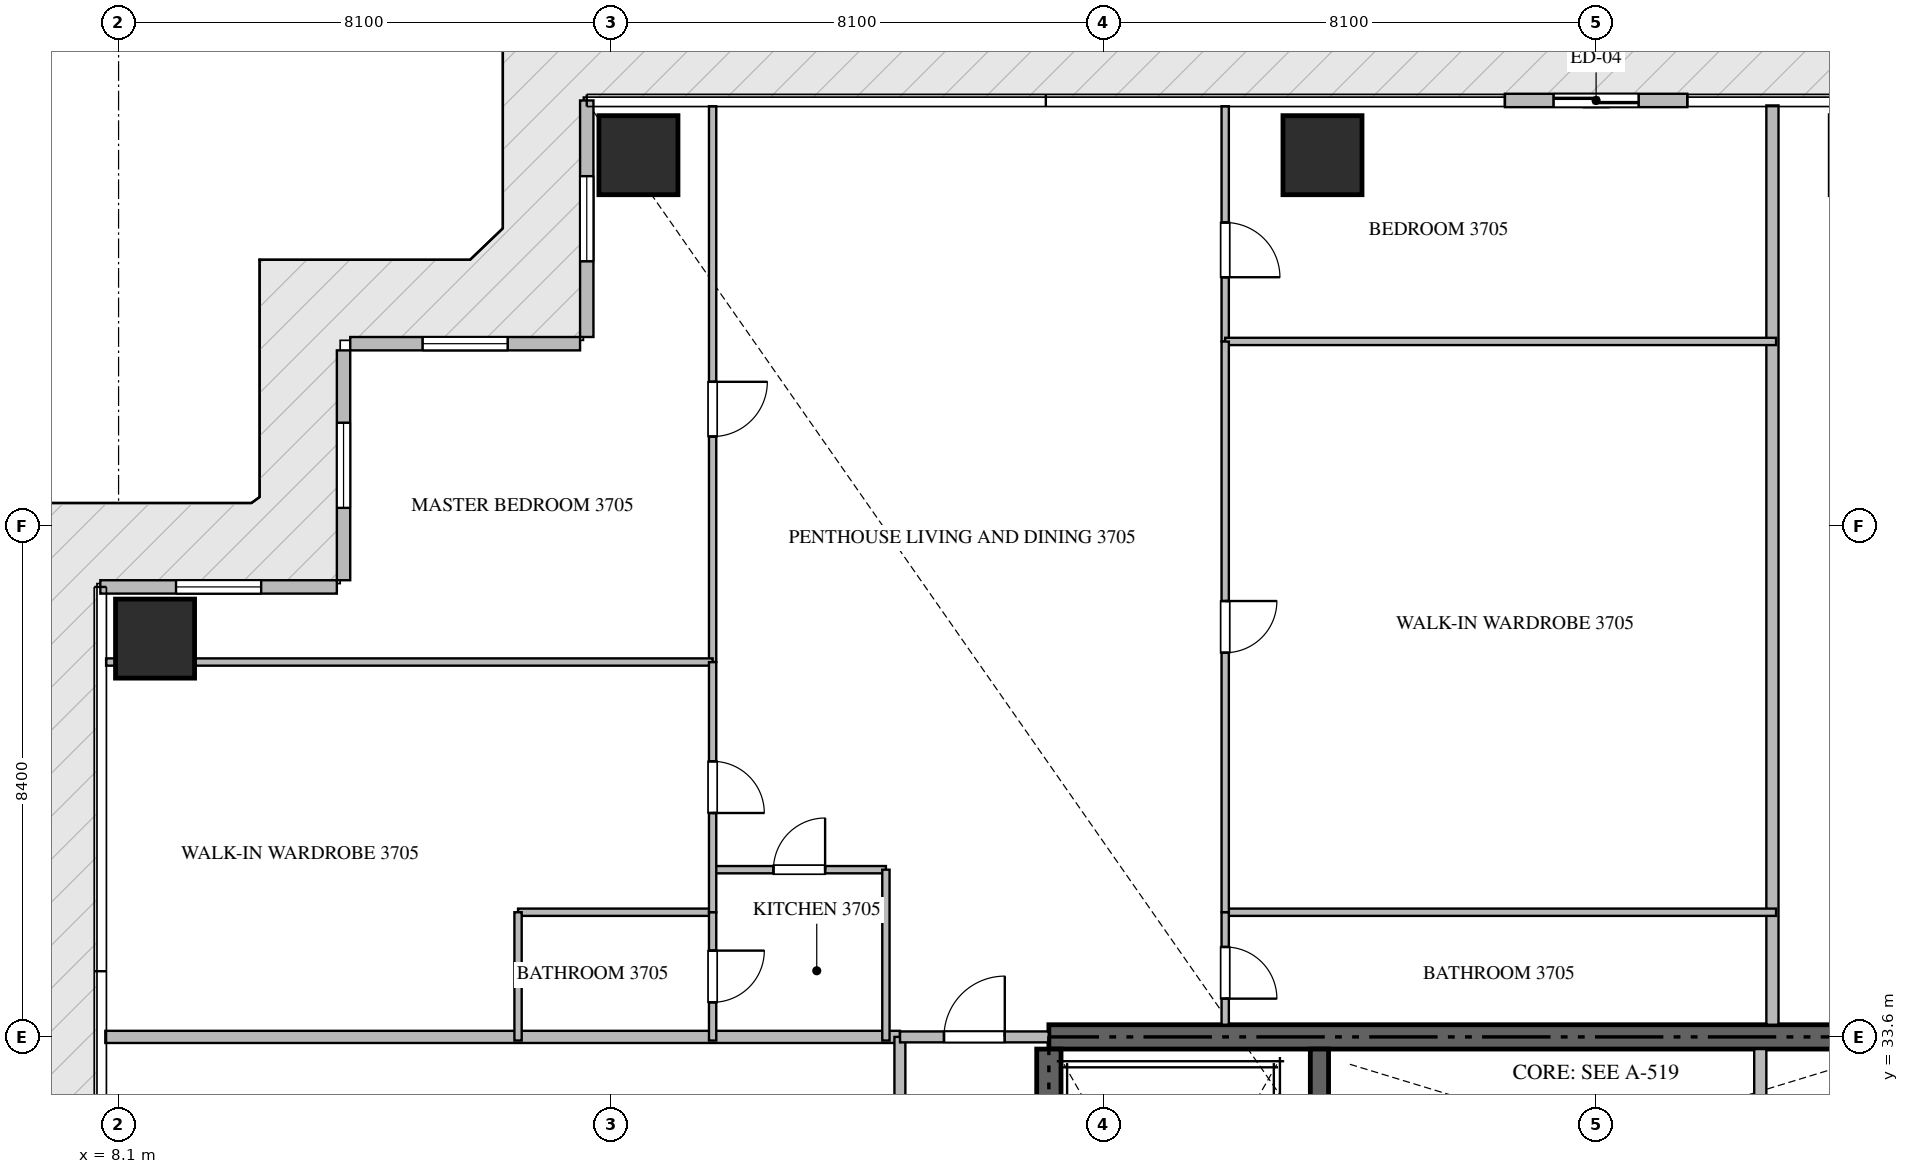
"""IFC4 building model, lengths in metres.
Left out: names, types, materials, properties, quantities, classifications, styles, units other than length and angle.
Written with IfcOpenShell. Run it as: python <this file> out.ifc"""

import sys

from ifc_helpers import new_model, si_unit, direction, frame, frame_2d, origin, origin_2d, place, context, subcontext, project, spatial, rectangle, extrude, source, transform, mapped, element, fill, save


model = new_model("IFC4")
c1 = context("Model", 3, precision=1e-05, world=origin(), true_north=direction((0.0, 1.0)))
c2 = subcontext(c1, "Body", "Model", "MODEL_VIEW")
j1 = project(units=[si_unit("LENGTHUNIT", "METRE"), si_unit("PLANEANGLEUNIT", "RADIAN")], contexts=[c1])
p1 = place(None, origin())
s1 = spatial("IfcSite", under=j1, at=p1, CompositionType="ELEMENT")
p2 = place(p1, origin())
s2 = spatial("IfcBuilding", under=s1, at=p2, CompositionType="ELEMENT")
p3 = place(p2, frame((0.0, 0.0, 150.15)))
s3 = spatial("IfcBuildingStorey", under=s2, at=p3, CompositionType="ELEMENT", Elevation=150.15)
p4 = place(p3, frame((41.4, 33.6, -0.26), z_axis=(0.0, 0.0, 1.0), x_axis=(-1.0, 0.0, 0.0)))
e1 = element("IfcWall", 1, at=p4, inside=s3, PredefinedType="SHEAR", context=c2, shape_type="SweptSolid", body=[
    extrude(rectangle(XDim=18.0, YDim=0.4, at=frame_2d((9.0, 0.0))), origin(), (0.0, 0.0, 1.0), 3.748),
])
p5 = place(p3, frame((23.4, 24.25, -0.26), z_axis=(0.0, 0.0, 1.0), x_axis=(0.0, 1.0, 0.0)))
e2 = element("IfcWall", 2, at=p5, inside=s3, PredefinedType="SHEAR", context=c2, shape_type="SweptSolid", body=[
    extrude(rectangle(XDim=9.15, YDim=0.4, at=frame_2d((4.575, 0.0))), origin(), (0.0, 0.0, 1.0), 3.748),
])
p6 = place(p3, frame((27.85, 23.55, -0.26), z_axis=(0.0, 0.0, 1.0), x_axis=(0.0, 1.0, 0.0)))
e3 = element("IfcWall", 3, at=p6, inside=s3, PredefinedType="SHEAR", context=c2, shape_type="SweptSolid", body=[
    extrude(rectangle(XDim=9.85, YDim=0.3, at=frame_2d((4.925, 0.0))), origin(), (0.0, 0.0, 1.0), 3.748),
])
m1 = source(origin(), c2, "Body", "SweptSolid", [
    extrude(rectangle(XDim=1.3, YDim=1.3, at=origin_2d()), origin(), (0.0, 0.0, 1.0), 3.75),
])
for number, where, z_axis, x_axis in (
    (4, (16.65, 48.1, -0.26), (0.0, 0.0, 1.0), (1.0, 0.0, 0.0)),
    (5, (27.9, 48.1, -0.26), (0.0, 0.0, 1.0), (1.0, 0.0, 0.0)),
    (6, (8.7, 40.15, -0.26), (0.0, 0.0, 1.0), (1.0, 0.0, 0.0)),
):
    element("IfcColumn", number, at=place(p3, frame(where, z_axis=z_axis, x_axis=x_axis)), inside=s3, PredefinedType="COLUMN", context=c2, shape_type="MappedRepresentation", body=[
        mapped(m1, transform((0.0, 0.0, 0.0), scale=1.0)),
    ])
p7 = place(p3, frame((33.9, 49.0, 0.0), z_axis=(0.0, 0.0, 1.0), x_axis=(-1.0, 0.0, 0.0)))
e7 = element("IfcWall", 7, at=p7, inside=s3, PredefinedType="ELEMENTEDWALL", context=c2, shape_type="SweptSolid", body=[
    extrude(rectangle(XDim=3.0, YDim=0.22, at=frame_2d((1.5, 0.0))), origin(), (0.0, 0.0, 1.0), 3.475),
])
p8 = place(p7, frame((0.8, 0.0, 0.0)))
e8 = element("IfcOpeningElement", 8, at=p8, cuts=e7, PredefinedType="OPENING", context=c2, shape_type="SweptSolid", body=[
    extrude(rectangle(XDim=1.4, YDim=2.25, at=frame_2d((0.7, 1.125))), frame((0.0, 0.12, 0.0), z_axis=(0.0, -1.0, 0.0), x_axis=(1.0, 0.0, 0.0)), (0.0, 0.0, 1.0), 0.24),
])
p9 = place(p3, frame((15.8, 49.0, 0.0), z_axis=(0.0, 0.0, 1.0), x_axis=(0.0, -1.0, 0.0)))
e9 = element("IfcWall", 9, at=p9, inside=s3, PredefinedType="ELEMENTEDWALL", context=c2, shape_type="SweptSolid", body=[
    extrude(rectangle(XDim=3.89, YDim=0.22, at=frame_2d((1.945, 0.0))), origin(), (0.0, 0.0, 1.0), 3.475),
])
p10 = place(p9, frame((1.245, 0.0, 0.65)))
e10 = element("IfcOpeningElement", 10, at=p10, cuts=e9, PredefinedType="OPENING", context=c2, shape_type="SweptSolid", body=[
    extrude(rectangle(XDim=1.4, YDim=2.05, at=frame_2d((0.7, 1.025))), frame((0.0, 0.12, 0.0), z_axis=(0.0, -1.0, 0.0), x_axis=(1.0, 0.0, 0.0)), (0.0, 0.0, 1.0), 0.24),
])
p11 = place(p3, frame((15.69, 45.0, 0.0), z_axis=(0.0, 0.0, 1.0), x_axis=(-1.0, 0.0, 0.0)))
e11 = element("IfcWall", 11, at=p11, inside=s3, PredefinedType="ELEMENTEDWALL", context=c2, shape_type="SweptSolid", body=[
    extrude(rectangle(XDim=3.78, YDim=0.22, at=frame_2d((1.89, 0.0))), origin(), (0.0, 0.0, 1.0), 3.475),
])
p12 = place(p11, frame((1.19, 0.0, 0.65)))
e12 = element("IfcOpeningElement", 12, at=p12, cuts=e11, PredefinedType="OPENING", context=c2, shape_type="SweptSolid", body=[
    extrude(rectangle(XDim=1.4, YDim=2.05, at=frame_2d((0.7, 1.025))), frame((0.0, 0.12, 0.0), z_axis=(0.0, -1.0, 0.0), x_axis=(1.0, 0.0, 0.0)), (0.0, 0.0, 1.0), 0.24),
])
p13 = place(p3, frame((11.8, 44.89, 0.0), z_axis=(0.0, 0.0, 1.0), x_axis=(0.0, -1.0, 0.0)))
e13 = element("IfcWall", 13, at=p13, inside=s3, PredefinedType="ELEMENTEDWALL", context=c2, shape_type="SweptSolid", body=[
    extrude(rectangle(XDim=3.78, YDim=0.22, at=frame_2d((1.89, 0.0))), origin(), (0.0, 0.0, 1.0), 3.475),
])
p14 = place(p13, frame((1.19, 0.0, 0.65)))
e14 = element("IfcOpeningElement", 14, at=p14, cuts=e13, PredefinedType="OPENING", context=c2, shape_type="SweptSolid", body=[
    extrude(rectangle(XDim=1.4, YDim=2.05, at=frame_2d((0.7, 1.025))), frame((0.0, 0.12, 0.0), z_axis=(0.0, -1.0, 0.0), x_axis=(1.0, 0.0, 0.0)), (0.0, 0.0, 1.0), 0.24),
])
p15 = place(p3, frame((11.69, 41.0, 0.0), z_axis=(0.0, 0.0, 1.0), x_axis=(-1.0, 0.0, 0.0)))
e15 = element("IfcWall", 15, at=p15, inside=s3, PredefinedType="ELEMENTEDWALL", context=c2, shape_type="SweptSolid", body=[
    extrude(rectangle(XDim=3.89, YDim=0.22, at=frame_2d((1.945, 0.0))), origin(), (0.0, 0.0, 1.0), 3.475),
])
p16 = place(p15, frame((1.245, 0.0, 0.65)))
e16 = element("IfcOpeningElement", 16, at=p16, cuts=e15, PredefinedType="OPENING", context=c2, shape_type="SweptSolid", body=[
    extrude(rectangle(XDim=1.4, YDim=2.05, at=frame_2d((0.7, 1.025))), frame((0.0, 0.12, 0.0), z_axis=(0.0, -1.0, 0.0), x_axis=(1.0, 0.0, 0.0)), (0.0, 0.0, 1.0), 0.24),
])
p17 = place(p3, frame((35.1, 30.75, 0.0), z_axis=(0.0, 0.0, 1.0), x_axis=(0.0, 1.0, 0.0)))
e17 = element("IfcWall", 17, at=p17, inside=s3, PredefinedType="STANDARD", context=c2, shape_type="SweptSolid", body=[
    extrude(rectangle(XDim=2.65, YDim=0.2, at=frame_2d((1.325, 0.0))), origin(), (0.0, 0.0, 1.0), 3.49),
])
p18 = place(p3, frame((35.3, 33.8, 0.0), z_axis=(0.0, 0.0, 1.0), x_axis=(0.0, 1.0, 0.0)))
e18 = element("IfcWall", 18, at=p18, inside=s3, PredefinedType="PARTITIONING", context=c2, shape_type="SweptSolid", body=[
    extrude(rectangle(XDim=15.118, YDim=0.2, at=frame_2d((7.559, 0.0))), origin(), (0.0, 0.0, 1.0), 3.49),
])
p19 = place(p3, frame((7.882, 33.6, 0.0), z_axis=(0.0, 0.0, 1.0), x_axis=(1.0, 0.0, 0.0)))
e19 = element("IfcWall", 19, at=p19, inside=s3, PredefinedType="PARTITIONING", context=c2, shape_type="SweptSolid", body=[
    extrude(rectangle(XDim=13.068, YDim=0.2, at=frame_2d((6.534, 0.0))), origin(), (0.0, 0.0, 1.0), 3.49),
])
p20 = place(p3, frame((20.95, 14.9, 0.0), z_axis=(0.0, 0.0, 1.0), x_axis=(0.0, 1.0, 0.0)))
e20 = element("IfcWall", 20, at=p20, inside=s3, PredefinedType="PARTITIONING", context=c2, shape_type="SweptSolid", body=[
    extrude(rectangle(XDim=18.7, YDim=0.18, at=frame_2d((9.35, 0.0))), origin(), (0.0, 0.0, 1.0), 3.49),
])
p21 = place(p20, frame((5.823, 0.0, 0.0)))
e21 = element("IfcOpeningElement", 21, at=p21, cuts=e20, PredefinedType="OPENING", context=c2, shape_type="SweptSolid", body=[
    extrude(rectangle(XDim=1.0, YDim=2.15, at=frame_2d((0.5, 1.075))), frame((0.0, 0.1, 0.0), z_axis=(0.0, -1.0, 0.0), x_axis=(1.0, 0.0, 0.0)), (0.0, 0.0, 1.0), 0.2),
])
p22 = place(p20, frame((15.134, 0.0, 0.0)))
e22 = element("IfcOpeningElement", 22, at=p22, cuts=e20, PredefinedType="OPENING", context=c2, shape_type="SweptSolid", body=[
    extrude(rectangle(XDim=1.0, YDim=2.15, at=frame_2d((0.5, 1.075))), frame((0.0, 0.1, 0.0), z_axis=(0.0, -1.0, 0.0), x_axis=(1.0, 0.0, 0.0)), (0.0, 0.0, 1.0), 0.2),
])
p23 = place(p3, frame((20.952, 33.6, 0.0), z_axis=(0.0, 0.0, 1.0), x_axis=(1.0, 0.0, 0.0)))
e23 = element("IfcWall", 23, at=p23, inside=s3, PredefinedType="PARTITIONING", context=c2, shape_type="SweptSolid", body=[
    extrude(rectangle(XDim=2.446, YDim=0.18, at=frame_2d((1.223, 0.0))), origin(), (0.0, 0.0, 1.0), 3.49),
])
p24 = place(p23, frame((0.723, 0.0, 0.0)))
e24 = element("IfcOpeningElement", 24, at=p24, cuts=e23, PredefinedType="OPENING", context=c2, shape_type="SweptSolid", body=[
    extrude(rectangle(XDim=1.0, YDim=2.15, at=frame_2d((0.5, 1.075))), frame((0.0, 0.1, 0.0), z_axis=(0.0, -1.0, 0.0), x_axis=(1.0, 0.0, 0.0)), (0.0, 0.0, 1.0), 0.2),
])
p25 = place(p3, frame((17.87, 36.35, 0.0), z_axis=(0.0, 0.0, 1.0), x_axis=(1.0, 0.0, 0.0)))
e25 = element("IfcWall", 25, at=p25, inside=s3, PredefinedType="PARTITIONING", context=c2, shape_type="SweptSolid", body=[
    extrude(rectangle(XDim=2.85, YDim=0.12, at=frame_2d((1.425, 0.0))), origin(), (0.0, 0.0, 1.0), 3.49),
])
p26 = place(p25, frame((1.0, 0.0, 0.0)))
e26 = element("IfcOpeningElement", 26, at=p26, cuts=e25, PredefinedType="OPENING", context=c2, shape_type="SweptSolid", body=[
    extrude(rectangle(XDim=0.85, YDim=2.1, at=frame_2d((0.425, 1.05))), frame((0.0, 0.07, 0.0), z_axis=(0.0, -1.0, 0.0), x_axis=(1.0, 0.0, 0.0)), (0.0, 0.0, 1.0), 0.14),
])
p27 = place(p3, frame((20.72, 36.35, 0.0), z_axis=(0.0, 0.0, 1.0), x_axis=(0.0, -1.0, 0.0)))
e27 = element("IfcWall", 27, at=p27, inside=s3, PredefinedType="PARTITIONING", context=c2, shape_type="SweptSolid", body=[
    extrude(rectangle(XDim=2.81, YDim=0.12, at=frame_2d((1.405, 0.0))), origin(), (0.0, 0.0, 1.0), 3.49),
])
p28 = place(p3, frame((17.87, 48.905, 0.0), z_axis=(0.0, 0.0, 1.0), x_axis=(0.0, -1.0, 0.0)))
e28 = element("IfcWall", 28, at=p28, inside=s3, PredefinedType="PARTITIONING", context=c2, shape_type="SweptSolid", body=[
    extrude(rectangle(XDim=9.14, YDim=0.12, at=frame_2d((4.57, 0.0))), origin(), (0.0, 0.0, 1.0), 3.49),
])
p29 = place(p28, frame((4.532, 0.0, 0.0)))
e29 = element("IfcOpeningElement", 29, at=p29, cuts=e28, PredefinedType="OPENING", context=c2, shape_type="SweptSolid", body=[
    extrude(rectangle(XDim=0.9, YDim=2.1, at=frame_2d((0.45, 1.05))), frame((0.0, 0.07, 0.0), z_axis=(0.0, -1.0, 0.0), x_axis=(1.0, 0.0, 0.0)), (0.0, 0.0, 1.0), 0.14),
])
p30 = place(p3, frame((7.895, 39.765, 0.0), z_axis=(0.0, 0.0, 1.0), x_axis=(1.0, 0.0, 0.0)))
e30 = element("IfcWall", 30, at=p30, inside=s3, PredefinedType="PARTITIONING", context=c2, shape_type="SweptSolid", body=[
    extrude(rectangle(XDim=9.975, YDim=0.12, at=frame_2d((4.988, 0.0))), origin(), (0.0, 0.0, 1.0), 3.49),
])
p31 = place(p3, frame((14.67, 35.65, 0.0), z_axis=(0.0, 0.0, 1.0), x_axis=(1.0, 0.0, 0.0)))
e31 = element("IfcWall", 31, at=p31, inside=s3, PredefinedType="PARTITIONING", context=c2, shape_type="SweptSolid", body=[
    extrude(rectangle(XDim=3.2, YDim=0.12, at=frame_2d((1.6, 0.0))), origin(), (0.0, 0.0, 1.0), 3.49),
])
p32 = place(p3, frame((14.67, 35.65, 0.0), z_axis=(0.0, 0.0, 1.0), x_axis=(0.0, -1.0, 0.0)))
e32 = element("IfcWall", 32, at=p32, inside=s3, PredefinedType="PARTITIONING", context=c2, shape_type="SweptSolid", body=[
    extrude(rectangle(XDim=2.11, YDim=0.12, at=frame_2d((1.055, 0.0))), origin(), (0.0, 0.0, 1.0), 3.49),
])
p33 = place(p3, frame((17.87, 39.763, 0.0), z_axis=(0.0, 0.0, 1.0), x_axis=(0.0, -1.0, 0.0)))
e33 = element("IfcWall", 33, at=p33, inside=s3, PredefinedType="PARTITIONING", context=c2, shape_type="SweptSolid", body=[
    extrude(rectangle(XDim=4.113, YDim=0.12, at=frame_2d((2.057, 0.0))), origin(), (0.0, 0.0, 1.0), 3.49),
])
p34 = place(p33, frame((1.631, 0.0, 0.0)))
e34 = element("IfcOpeningElement", 34, at=p34, cuts=e33, PredefinedType="OPENING", context=c2, shape_type="SweptSolid", body=[
    extrude(rectangle(XDim=0.85, YDim=2.1, at=frame_2d((0.425, 1.05))), frame((0.0, 0.07, 0.0), z_axis=(0.0, -1.0, 0.0), x_axis=(1.0, 0.0, 0.0)), (0.0, 0.0, 1.0), 0.14),
])
p35 = place(p3, frame((17.87, 35.648, 0.0), z_axis=(0.0, 0.0, 1.0), x_axis=(0.0, -1.0, 0.0)))
e35 = element("IfcWall", 35, at=p35, inside=s3, PredefinedType="PARTITIONING", context=c2, shape_type="SweptSolid", body=[
    extrude(rectangle(XDim=2.108, YDim=0.12, at=frame_2d((1.054, 0.0))), origin(), (0.0, 0.0, 1.0), 3.49),
])
p36 = place(p35, frame((0.629, 0.0, 0.0)))
e36 = element("IfcOpeningElement", 36, at=p36, cuts=e35, PredefinedType="OPENING", context=c2, shape_type="SweptSolid", body=[
    extrude(rectangle(XDim=0.85, YDim=2.1, at=frame_2d((0.425, 1.05))), frame((0.0, 0.07, 0.0), z_axis=(0.0, -1.0, 0.0), x_axis=(1.0, 0.0, 0.0)), (0.0, 0.0, 1.0), 0.14),
])
p37 = place(p3, frame((26.3, 48.905, 0.0), z_axis=(0.0, 0.0, 1.0), x_axis=(0.0, -1.0, 0.0)))
e37 = element("IfcWall", 37, at=p37, inside=s3, PredefinedType="PARTITIONING", context=c2, shape_type="SweptSolid", body=[
    extrude(rectangle(XDim=3.868, YDim=0.12, at=frame_2d((1.934, 0.0))), origin(), (0.0, 0.0, 1.0), 3.49),
])
p38 = place(p37, frame((1.912, 0.0, 0.0)))
e38 = element("IfcOpeningElement", 38, at=p38, cuts=e37, PredefinedType="OPENING", context=c2, shape_type="SweptSolid", body=[
    extrude(rectangle(XDim=0.9, YDim=2.1, at=frame_2d((0.45, 1.05))), frame((0.0, 0.07, 0.0), z_axis=(0.0, -1.0, 0.0), x_axis=(1.0, 0.0, 0.0)), (0.0, 0.0, 1.0), 0.14),
])
for number, where, z_axis, x_axis in (
    (39, (26.3, 45.037, 0.0), (0.0, 0.0, 1.0), (1.0, 0.0, 0.0)),
    (40, (26.3, 35.65, 0.0), (0.0, 0.0, 1.0), (1.0, 0.0, 0.0)),
):
    element("IfcWall", number, at=place(p3, frame(where, z_axis=z_axis, x_axis=x_axis)), inside=s3, PredefinedType="PARTITIONING", context=c2, shape_type="SweptSolid", body=[
        extrude(rectangle(XDim=9.06, YDim=0.12, at=frame_2d((4.53, 0.0))), origin(), (0.0, 0.0, 1.0), 3.49),
    ])
p39 = place(p3, frame((26.3, 45.035, 0.0), z_axis=(0.0, 0.0, 1.0), x_axis=(0.0, -1.0, 0.0)))
e41 = element("IfcWall", 41, at=p39, inside=s3, PredefinedType="PARTITIONING", context=c2, shape_type="SweptSolid", body=[
    extrude(rectangle(XDim=9.385, YDim=0.12, at=frame_2d((4.692, 0.0))), origin(), (0.0, 0.0, 1.0), 3.49),
])
p40 = place(p39, frame((4.267, 0.0, 0.0)))
e42 = element("IfcOpeningElement", 42, at=p40, cuts=e41, PredefinedType="OPENING", context=c2, shape_type="SweptSolid", body=[
    extrude(rectangle(XDim=0.85, YDim=2.1, at=frame_2d((0.425, 1.05))), frame((0.0, 0.07, 0.0), z_axis=(0.0, -1.0, 0.0), x_axis=(1.0, 0.0, 0.0)), (0.0, 0.0, 1.0), 0.14),
])
p41 = place(p3, frame((26.3, 35.648, 0.0), z_axis=(0.0, 0.0, 1.0), x_axis=(0.0, -1.0, 0.0)))
e43 = element("IfcWall", 43, at=p41, inside=s3, PredefinedType="PARTITIONING", context=c2, shape_type="SweptSolid", body=[
    extrude(rectangle(XDim=1.848, YDim=0.12, at=frame_2d((0.924, 0.0))), origin(), (0.0, 0.0, 1.0), 3.49),
])
p42 = place(p41, frame((0.569, 0.0, 0.0)))
e44 = element("IfcOpeningElement", 44, at=p42, cuts=e43, PredefinedType="OPENING", context=c2, shape_type="SweptSolid", body=[
    extrude(rectangle(XDim=0.85, YDim=2.1, at=frame_2d((0.425, 1.05))), frame((0.0, 0.07, 0.0), z_axis=(0.0, -1.0, 0.0), x_axis=(1.0, 0.0, 0.0)), (0.0, 0.0, 1.0), 0.14),
])
m2 = source(origin(), c2, "Body", "SweptSolid", [
    extrude(rectangle(XDim=1.4, YDim=2.25, at=frame_2d((0.7, 1.125))), frame((0.0, 0.025, 0.0), z_axis=(0.0, -1.0, 0.0), x_axis=(1.0, 0.0, 0.0)), (0.0, 0.0, 1.0), 0.05),
])
p43 = place(p8, origin())
e45 = element("IfcDoor", 45, at=p43, inside=s3, OperationType="SLIDING_TO_LEFT", PredefinedType="DOOR", context=c2, shape_type="MappedRepresentation", body=[
    mapped(m2, transform((0.0, 0.0, 0.0), scale=1.0)),
])
fill(e8, e45)
m3 = source(origin(), c2, "Body", "SweptSolid", [
    extrude(rectangle(XDim=1.4, YDim=2.05, at=frame_2d((0.7, 1.025))), frame((0.0, 0.03, 0.0), z_axis=(0.0, -1.0, 0.0), x_axis=(1.0, 0.0, 0.0)), (0.0, 0.0, 1.0), 0.06),
])
p44 = place(p10, origin())
e46 = element("IfcWindow", 46, at=p44, inside=s3, PartitioningType="SINGLE_PANEL", PredefinedType="WINDOW", context=c2, shape_type="MappedRepresentation", body=[
    mapped(m3, transform((0.0, 0.0, 0.0), scale=1.0)),
])
fill(e10, e46)
p45 = place(p12, origin())
e47 = element("IfcWindow", 47, at=p45, inside=s3, PartitioningType="SINGLE_PANEL", PredefinedType="WINDOW", context=c2, shape_type="MappedRepresentation", body=[
    mapped(m3, transform((0.0, 0.0, 0.0), scale=1.0)),
])
fill(e12, e47)
p46 = place(p14, origin())
e48 = element("IfcWindow", 48, at=p46, inside=s3, PartitioningType="SINGLE_PANEL", PredefinedType="WINDOW", context=c2, shape_type="MappedRepresentation", body=[
    mapped(m3, transform((0.0, 0.0, 0.0), scale=1.0)),
])
fill(e14, e48)
p47 = place(p16, origin())
e49 = element("IfcWindow", 49, at=p47, inside=s3, PartitioningType="SINGLE_PANEL", PredefinedType="WINDOW", context=c2, shape_type="MappedRepresentation", body=[
    mapped(m3, transform((0.0, 0.0, 0.0), scale=1.0)),
])
fill(e16, e49)
m4 = source(origin(), c2, "Body", "SweptSolid", [
    extrude(rectangle(XDim=1.0, YDim=2.15, at=frame_2d((0.5, 1.075))), frame((0.0, 0.025, 0.0), z_axis=(0.0, -1.0, 0.0), x_axis=(1.0, 0.0, 0.0)), (0.0, 0.0, 1.0), 0.05),
])
p48 = place(p24, origin())
e50 = element("IfcDoor", 50, at=p48, inside=s3, OperationType="SINGLE_SWING_RIGHT", PredefinedType="DOOR", context=c2, shape_type="MappedRepresentation", body=[
    mapped(m4, transform((0.0, 0.0, 0.0), scale=1.0)),
])
fill(e24, e50)
m5 = source(origin(), c2, "Body", "SweptSolid", [
    extrude(rectangle(XDim=0.85, YDim=2.1, at=frame_2d((0.425, 1.05))), frame((0.0, 0.025, 0.0), z_axis=(0.0, -1.0, 0.0), x_axis=(1.0, 0.0, 0.0)), (0.0, 0.0, 1.0), 0.05),
])
p49 = place(p26, origin())
e51 = element("IfcDoor", 51, at=p49, inside=s3, OperationType="SINGLE_SWING_RIGHT", PredefinedType="DOOR", context=c2, shape_type="MappedRepresentation", body=[
    mapped(m5, transform((0.0, 0.0, 0.0), scale=1.0)),
])
fill(e26, e51)
m6 = source(origin(), c2, "Body", "SweptSolid", [
    extrude(rectangle(XDim=0.9, YDim=2.1, at=frame_2d((0.45, 1.05))), frame((0.0, 0.025, 0.0), z_axis=(0.0, -1.0, 0.0), x_axis=(1.0, 0.0, 0.0)), (0.0, 0.0, 1.0), 0.05),
])
p50 = place(p29, origin())
e52 = element("IfcDoor", 52, at=p50, inside=s3, OperationType="SINGLE_SWING_LEFT", PredefinedType="DOOR", context=c2, shape_type="MappedRepresentation", body=[
    mapped(m6, transform((0.0, 0.0, 0.0), scale=1.0)),
])
fill(e29, e52)
p51 = place(p34, origin())
e53 = element("IfcDoor", 53, at=p51, inside=s3, OperationType="SINGLE_SWING_RIGHT", PredefinedType="DOOR", context=c2, shape_type="MappedRepresentation", body=[
    mapped(m5, transform((0.0, 0.0, 0.0), scale=1.0)),
])
fill(e34, e53)
p52 = place(p36, origin())
e54 = element("IfcDoor", 54, at=p52, inside=s3, OperationType="SINGLE_SWING_LEFT", PredefinedType="DOOR", context=c2, shape_type="MappedRepresentation", body=[
    mapped(m5, transform((0.0, 0.0, 0.0), scale=1.0)),
])
fill(e36, e54)
p53 = place(p38, origin())
e55 = element("IfcDoor", 55, at=p53, inside=s3, OperationType="SINGLE_SWING_RIGHT", PredefinedType="DOOR", context=c2, shape_type="MappedRepresentation", body=[
    mapped(m6, transform((0.0, 0.0, 0.0), scale=1.0)),
])
fill(e38, e55)
p54 = place(p40, origin())
e56 = element("IfcDoor", 56, at=p54, inside=s3, OperationType="SINGLE_SWING_LEFT", PredefinedType="DOOR", context=c2, shape_type="MappedRepresentation", body=[
    mapped(m5, transform((0.0, 0.0, 0.0), scale=1.0)),
])
fill(e42, e56)
p55 = place(p42, origin())
e57 = element("IfcDoor", 57, at=p55, inside=s3, OperationType="SINGLE_SWING_RIGHT", PredefinedType="DOOR", context=c2, shape_type="MappedRepresentation", body=[
    mapped(m5, transform((0.0, 0.0, 0.0), scale=1.0)),
])
fill(e44, e57)
save(model, sys.argv[1])
